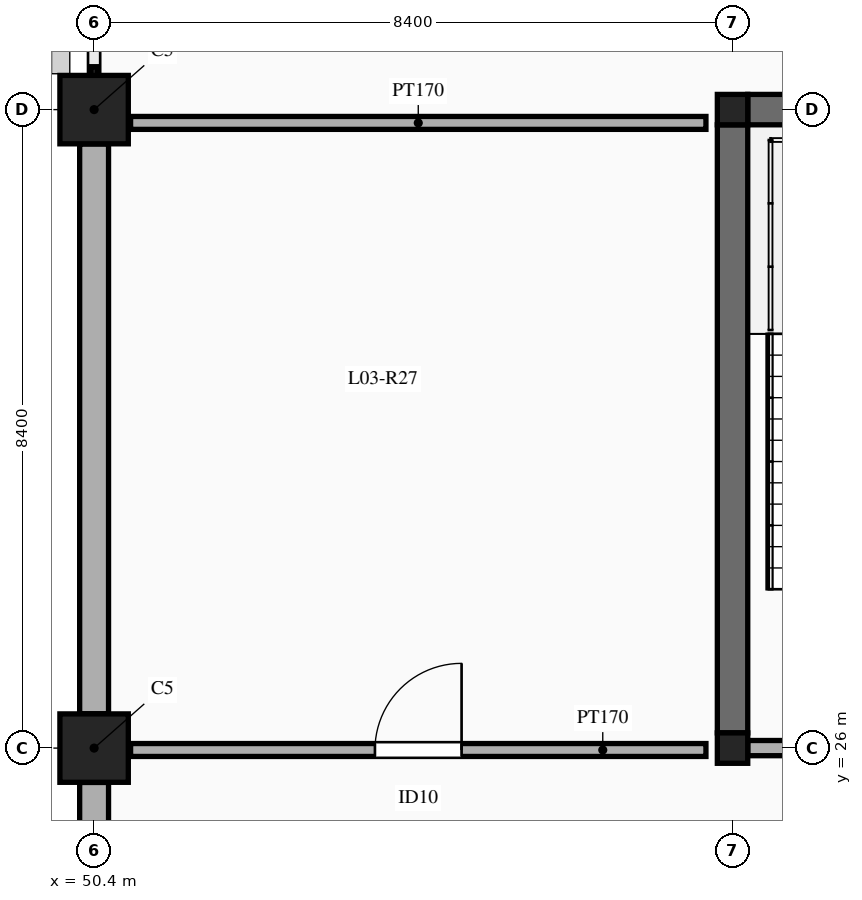
"""IFC4 building model, lengths in metres.
Left out: names, types, materials, properties, quantities, classifications, styles, units other than length and angle.
Written with IfcOpenShell. Run it as: python <this file> out.ifc"""

import sys

from ifc_helpers import new_model, si_unit, direction, frame, frame_2d, origin, origin_2d, place, context, subcontext, project, spatial, rectangle, extrude, element, fill, save


model = new_model("IFC4")
c1 = context("Model", 3, precision=1e-05, world=origin(), true_north=direction((0.0, 1.0)))
c2 = subcontext(c1, "Body", "Model", "MODEL_VIEW")
j1 = project(units=[si_unit("LENGTHUNIT", "METRE"), si_unit("PLANEANGLEUNIT", "RADIAN")], contexts=[c1])
p1 = place(None, origin())
s1 = spatial("IfcSite", under=j1, at=p1, CompositionType="ELEMENT")
p2 = place(p1, origin())
s2 = spatial("IfcBuilding", under=s1, at=p2, CompositionType="ELEMENT")
p3 = place(p2, frame((0.0, 0.0, 15.0)))
s3 = spatial("IfcBuildingStorey", under=s2, at=p3, CompositionType="ELEMENT", Elevation=15.0)
for number, where, z_axis, x_axis in (
    (1, (50.4, 26.0, 0.0), (0.0, 0.0, 1.0), (1.0, 0.0, 0.0)),
    (2, (50.4, 34.4, 0.0), (0.0, 0.0, 1.0), (1.0, 0.0, 0.0)),
):
    element("IfcColumn", number, at=place(p3, frame(where, z_axis=z_axis, x_axis=x_axis)), inside=s3, PredefinedType="COLUMN", context=c2, shape_type="SweptSolid", body=[
        extrude(rectangle(XDim=0.9, YDim=0.9, at=origin_2d()), origin(), (0.0, 0.0, 1.0), 4.5),
    ])
for number, where, z_axis, x_axis in (
    (3, (58.8, 26.0, 0.0), (0.0, 0.0, 1.0), (1.0, 0.0, 0.0)),
    (4, (58.8, 34.4, 0.0), (0.0, 0.0, 1.0), (1.0, 0.0, 0.0)),
):
    element("IfcColumn", number, at=place(p3, frame(where, z_axis=z_axis, x_axis=x_axis)), inside=s3, PredefinedType="COLUMN", context=c2, shape_type="SweptSolid", body=[
        extrude(rectangle(XDim=0.4, YDim=0.4, at=origin_2d()), origin(), (0.0, 0.0, 1.0), 4.5),
    ])
for number, where, z_axis, x_axis in (
    (5, (58.8, 26.2, 0.0), (0.0, 0.0, 1.0), (0.0, 1.0, 0.0)),
    (6, (59.0, 34.4, 0.0), (0.0, 0.0, 1.0), (1.0, 0.0, 0.0)),
):
    element("IfcWall", number, at=place(p3, frame(where, z_axis=z_axis, x_axis=x_axis)), inside=s3, PredefinedType="SHEAR", context=c2, shape_type="SweptSolid", body=[
        extrude(rectangle(XDim=8.0, YDim=0.4, at=frame_2d((4.0, 0.0))), origin(), (0.0, 0.0, 1.0), 4.5),
    ])
for number, where, z_axis, x_axis in (
    (7, (50.4, 18.052, 0.0), (0.0, 0.0, 1.0), (0.0, 1.0, 0.0)),
    (8, (50.4, 26.452, 0.0), (0.0, 0.0, 1.0), (0.0, 1.0, 0.0)),
):
    element("IfcWall", number, at=place(p3, frame(where, z_axis=z_axis, x_axis=x_axis)), inside=s3, PredefinedType="SOLIDWALL", context=c2, shape_type="SweptSolid", body=[
        extrude(rectangle(XDim=7.496, YDim=0.38, at=frame_2d((3.748, 0.0))), origin(), (0.0, 0.0, 1.0), 3.55),
    ])
p4 = place(p3, frame((59.0, 26.0, 0.0), z_axis=(0.0, 0.0, 1.0), x_axis=(1.0, 0.0, 0.0)))
e9 = element("IfcWall", 9, at=p4, inside=s3, PredefinedType="SOLIDWALL", context=c2, shape_type="SweptSolid", body=[
    extrude(rectangle(XDim=8.0, YDim=0.2, at=frame_2d((4.0, 0.0))), origin(), (0.0, 0.0, 1.0), 3.48),
])
p5 = place(p4, frame((1.55, 0.0, 0.0)))
e10 = element("IfcOpeningElement", 10, at=p5, cuts=e9, PredefinedType="OPENING", context=c2, shape_type="SweptSolid", body=[
    extrude(rectangle(XDim=1.15, YDim=2.15, at=frame_2d((0.575, 1.075))), frame((0.0, 0.11, 0.0), z_axis=(0.0, -1.0, 0.0), x_axis=(1.0, 0.0, 0.0)), (0.0, 0.0, 1.0), 0.22),
])
p6 = place(p4, frame((5.35, 0.0, 0.0)))
e11 = element("IfcOpeningElement", 11, at=p6, cuts=e9, PredefinedType="OPENING", context=c2, shape_type="SweptSolid", body=[
    extrude(rectangle(XDim=1.22, YDim=2.15, at=frame_2d((0.61, 1.075))), frame((0.0, 0.11, 0.0), z_axis=(0.0, -1.0, 0.0), x_axis=(1.0, 0.0, 0.0)), (0.0, 0.0, 1.0), 0.22),
])
p7 = place(p3, frame((50.88, 25.975, 0.0), z_axis=(0.0, 0.0, 1.0), x_axis=(1.0, 0.0, 0.0)))
e12 = element("IfcWall", 12, at=p7, inside=s3, PredefinedType="PARTITIONING", context=c2, shape_type="SweptSolid", body=[
    extrude(rectangle(XDim=7.57, YDim=0.17, at=frame_2d((3.785, 0.0))), origin(), (0.0, 0.0, 1.0), 3.45),
])
p8 = place(p7, frame((3.215, 0.0, 0.0)))
e13 = element("IfcOpeningElement", 13, at=p8, cuts=e12, PredefinedType="OPENING", context=c2, shape_type="SweptSolid", body=[
    extrude(rectangle(XDim=1.14, YDim=2.22, at=frame_2d((0.57, 1.11))), frame((0.0, 0.095, 0.0), z_axis=(0.0, -1.0, 0.0), x_axis=(1.0, 0.0, 0.0)), (0.0, 0.0, 1.0), 0.19),
])
p9 = place(p3, frame((50.88, 34.225, 0.0), z_axis=(0.0, 0.0, 1.0), x_axis=(1.0, 0.0, 0.0)))
e14 = element("IfcWall", 14, at=p9, inside=s3, PredefinedType="PARTITIONING", context=c2, shape_type="SweptSolid", body=[
    extrude(rectangle(XDim=7.57, YDim=0.17, at=frame_2d((3.785, 0.0))), origin(), (0.0, 0.0, 1.0), 3.45),
])
p10 = place(p8, origin())
e15 = element("IfcDoor", 15, at=p10, inside=s3, OperationType="SINGLE_SWING_RIGHT", PredefinedType="DOOR", context=c2, shape_type="SweptSolid", body=[
    extrude(rectangle(XDim=1.14, YDim=2.22, at=frame_2d((0.57, 1.11))), frame((0.0, 0.025, 0.0), z_axis=(0.0, -1.0, 0.0), x_axis=(1.0, 0.0, 0.0)), (0.0, 0.0, 1.0), 0.05),
])
fill(e13, e15)
save(model, sys.argv[1])
